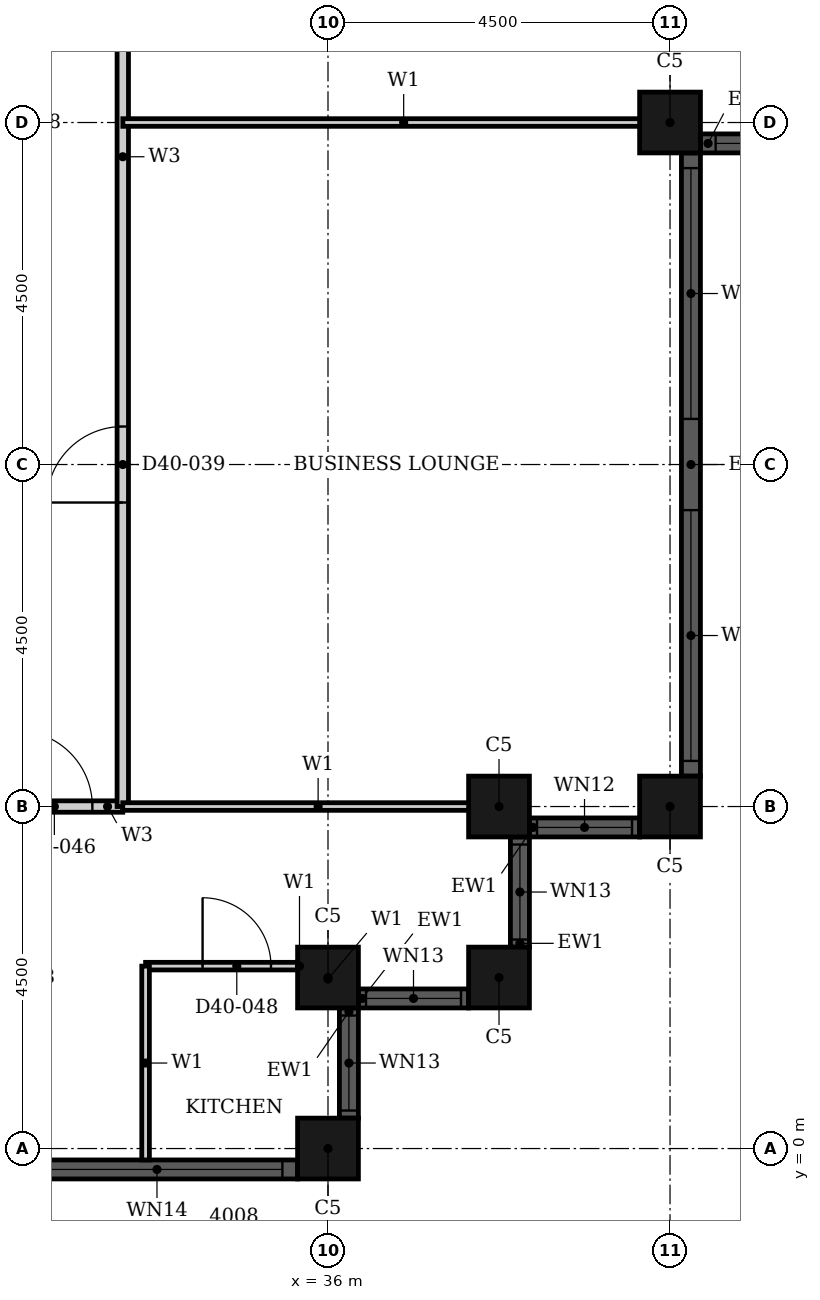
"""IFC4 building model, lengths in metres.
Left out: names, types, materials, properties, quantities, classifications, styles, units other than length and angle.
Written with IfcOpenShell. Run it as: python <this file> out.ifc"""

import sys

from ifc_helpers import new_model, si_unit, direction, frame, frame_2d, origin, origin_2d, place, context, subcontext, project, spatial, rectangle, hollow_rectangle, extrude, element, fill, save


model = new_model("IFC4")
c1 = context("Model", 3, precision=1e-05, world=origin(), true_north=direction((0.0, 1.0)))
c2 = subcontext(c1, "Body", "Model", "MODEL_VIEW")
j1 = project(units=[si_unit("LENGTHUNIT", "METRE"), si_unit("PLANEANGLEUNIT", "RADIAN")], contexts=[c1])
p1 = place(None, origin())
s1 = spatial("IfcSite", under=j1, at=p1, CompositionType="ELEMENT")
p2 = place(p1, origin())
s2 = spatial("IfcBuilding", under=s1, at=p2, CompositionType="ELEMENT")
p3 = place(p2, frame((0.0, 0.0, 161.7)))
s3 = spatial("IfcBuildingStorey", under=s2, at=p3, CompositionType="ELEMENT", Elevation=161.7)
for number, where, z_axis, x_axis in (
    (1, (36.0, 0.0, 0.0), (0.0, 0.0, 1.0), (1.0, 0.0, 0.0)),
    (2, (36.0, 2.25, 0.0), (0.0, 0.0, 1.0), (1.0, 0.0, 0.0)),
    (3, (38.25, 2.25, 0.0), (0.0, 0.0, 1.0), (1.0, 0.0, 0.0)),
    (4, (38.25, 4.5, 0.0), (0.0, 0.0, 1.0), (1.0, 0.0, 0.0)),
    (5, (40.5, 4.5, 0.0), (0.0, 0.0, 1.0), (1.0, 0.0, 0.0)),
    (6, (40.5, 13.5, 0.0), (0.0, 0.0, 1.0), (1.0, 0.0, 0.0)),
):
    element("IfcColumn", number, at=place(p3, frame(where, z_axis=z_axis, x_axis=x_axis)), inside=s3, PredefinedType="COLUMN", context=c2, shape_type="SweptSolid", body=[
        extrude(hollow_rectangle(XDim=0.8, YDim=0.8, WallThickness=0.025, at=origin_2d()), origin(), (0.0, 0.0, 1.0), 3.7),
    ])
p4 = place(p3, frame((27.4, -0.275, 0.0), z_axis=(0.0, 0.0, 1.0), x_axis=(1.0, 0.0, 0.0)))
e7 = element("IfcWall", 7, at=p4, inside=s3, PredefinedType="SOLIDWALL", context=c2, shape_type="SweptSolid", body=[
    extrude(rectangle(XDim=8.2, YDim=0.25, at=frame_2d((4.1, 0.0))), origin(), (0.0, 0.0, 1.0), 3.7),
])
p5 = place(p4, frame((0.2, 0.0, 0.45)))
e8 = element("IfcOpeningElement", 8, at=p5, cuts=e7, PredefinedType="OPENING", context=c2, shape_type="SweptSolid", body=[
    extrude(rectangle(XDim=3.3, YDim=2.53, at=frame_2d((1.65, 1.265))), frame((0.0, 0.135, 0.0), z_axis=(0.0, -1.0, 0.0), x_axis=(1.0, 0.0, 0.0)), (0.0, 0.0, 1.0), 0.27),
])
p6 = place(p4, frame((4.7, 0.0, 0.45)))
e9 = element("IfcOpeningElement", 9, at=p6, cuts=e7, PredefinedType="OPENING", context=c2, shape_type="SweptSolid", body=[
    extrude(rectangle(XDim=3.3, YDim=2.53, at=frame_2d((1.65, 1.265))), frame((0.0, 0.135, 0.0), z_axis=(0.0, -1.0, 0.0), x_axis=(1.0, 0.0, 0.0)), (0.0, 0.0, 1.0), 0.27),
])
p7 = place(p3, frame((36.275, 0.4, 0.0), z_axis=(0.0, 0.0, 1.0), x_axis=(0.0, 1.0, 0.0)))
e10 = element("IfcWall", 10, at=p7, inside=s3, PredefinedType="SOLIDWALL", context=c2, shape_type="SweptSolid", body=[
    extrude(rectangle(XDim=1.45, YDim=0.25, at=frame_2d((0.725, 0.0))), origin(), (0.0, 0.0, 1.0), 3.7),
])
p8 = place(p7, frame((0.1, 0.0, 0.9)))
e11 = element("IfcOpeningElement", 11, at=p8, cuts=e10, PredefinedType="OPENING", context=c2, shape_type="SweptSolid", body=[
    extrude(rectangle(XDim=1.25, YDim=1.85, at=frame_2d((0.625, 0.925))), frame((0.0, 0.135, 0.0), z_axis=(0.0, -1.0, 0.0), x_axis=(1.0, 0.0, 0.0)), (0.0, 0.0, 1.0), 0.27),
])
p9 = place(p3, frame((36.4, 1.975, 0.0), z_axis=(0.0, 0.0, 1.0), x_axis=(1.0, 0.0, 0.0)))
e12 = element("IfcWall", 12, at=p9, inside=s3, PredefinedType="SOLIDWALL", context=c2, shape_type="SweptSolid", body=[
    extrude(rectangle(XDim=1.45, YDim=0.25, at=frame_2d((0.725, 0.0))), origin(), (0.0, 0.0, 1.0), 3.7),
])
p10 = place(p9, frame((0.1, 0.0, 0.9)))
e13 = element("IfcOpeningElement", 13, at=p10, cuts=e12, PredefinedType="OPENING", context=c2, shape_type="SweptSolid", body=[
    extrude(rectangle(XDim=1.25, YDim=1.85, at=frame_2d((0.625, 0.925))), frame((0.0, 0.135, 0.0), z_axis=(0.0, -1.0, 0.0), x_axis=(1.0, 0.0, 0.0)), (0.0, 0.0, 1.0), 0.27),
])
p11 = place(p3, frame((38.525, 2.65, 0.0), z_axis=(0.0, 0.0, 1.0), x_axis=(0.0, 1.0, 0.0)))
e14 = element("IfcWall", 14, at=p11, inside=s3, PredefinedType="SOLIDWALL", context=c2, shape_type="SweptSolid", body=[
    extrude(rectangle(XDim=1.45, YDim=0.25, at=frame_2d((0.725, 0.0))), origin(), (0.0, 0.0, 1.0), 3.7),
])
p12 = place(p11, frame((0.1, 0.0, 0.9)))
e15 = element("IfcOpeningElement", 15, at=p12, cuts=e14, PredefinedType="OPENING", context=c2, shape_type="SweptSolid", body=[
    extrude(rectangle(XDim=1.25, YDim=1.85, at=frame_2d((0.625, 0.925))), frame((0.0, 0.135, 0.0), z_axis=(0.0, -1.0, 0.0), x_axis=(1.0, 0.0, 0.0)), (0.0, 0.0, 1.0), 0.27),
])
p13 = place(p3, frame((38.65, 4.225, 0.0), z_axis=(0.0, 0.0, 1.0), x_axis=(1.0, 0.0, 0.0)))
e16 = element("IfcWall", 16, at=p13, inside=s3, PredefinedType="SOLIDWALL", context=c2, shape_type="SweptSolid", body=[
    extrude(rectangle(XDim=1.45, YDim=0.25, at=frame_2d((0.725, 0.0))), origin(), (0.0, 0.0, 1.0), 3.7),
])
p14 = place(p13, frame((0.1, 0.0, 0.9)))
e17 = element("IfcOpeningElement", 17, at=p14, cuts=e16, PredefinedType="OPENING", context=c2, shape_type="SweptSolid", body=[
    extrude(rectangle(XDim=1.25, YDim=2.08, at=frame_2d((0.625, 1.04))), frame((0.0, 0.135, 0.0), z_axis=(0.0, -1.0, 0.0), x_axis=(1.0, 0.0, 0.0)), (0.0, 0.0, 1.0), 0.27),
])
p15 = place(p3, frame((40.775, 4.9, 0.0), z_axis=(0.0, 0.0, 1.0), x_axis=(0.0, 1.0, 0.0)))
e18 = element("IfcWall", 18, at=p15, inside=s3, PredefinedType="SOLIDWALL", context=c2, shape_type="SweptSolid", body=[
    extrude(rectangle(XDim=8.2, YDim=0.25, at=frame_2d((4.1, 0.0))), origin(), (0.0, 0.0, 1.0), 3.7),
])
p16 = place(p15, frame((0.2, 0.0, 0.45)))
e19 = element("IfcOpeningElement", 19, at=p16, cuts=e18, PredefinedType="OPENING", context=c2, shape_type="SweptSolid", body=[
    extrude(rectangle(XDim=3.3, YDim=2.3, at=frame_2d((1.65, 1.15))), frame((0.0, 0.135, 0.0), z_axis=(0.0, -1.0, 0.0), x_axis=(1.0, 0.0, 0.0)), (0.0, 0.0, 1.0), 0.27),
])
p17 = place(p15, frame((4.7, 0.0, 0.45)))
e20 = element("IfcOpeningElement", 20, at=p17, cuts=e18, PredefinedType="OPENING", context=c2, shape_type="SweptSolid", body=[
    extrude(rectangle(XDim=3.3, YDim=2.3, at=frame_2d((1.65, 1.15))), frame((0.0, 0.135, 0.0), z_axis=(0.0, -1.0, 0.0), x_axis=(1.0, 0.0, 0.0)), (0.0, 0.0, 1.0), 0.27),
])
p18 = place(p3, frame((40.9, 13.225, 0.0), z_axis=(0.0, 0.0, 1.0), x_axis=(1.0, 0.0, 0.0)))
e21 = element("IfcWall", 21, at=p18, inside=s3, PredefinedType="SOLIDWALL", context=c2, shape_type="SweptSolid", body=[
    extrude(rectangle(XDim=3.7, YDim=0.25, at=frame_2d((1.85, 0.0))), origin(), (0.0, 0.0, 1.0), 3.7),
])
p19 = place(p18, frame((0.2, 0.0, 0.45)))
e22 = element("IfcOpeningElement", 22, at=p19, cuts=e21, PredefinedType="OPENING", context=c2, shape_type="SweptSolid", body=[
    extrude(rectangle(XDim=3.3, YDim=2.3, at=frame_2d((1.65, 1.15))), frame((0.0, 0.135, 0.0), z_axis=(0.0, -1.0, 0.0), x_axis=(1.0, 0.0, 0.0)), (0.0, 0.0, 1.0), 0.27),
])
p20 = place(p3, frame((31.5, 4.5, 0.0), z_axis=(0.0, 0.0, 1.0), x_axis=(1.0, 0.0, 0.0)))
e23 = element("IfcWall", 23, at=p20, inside=s3, PredefinedType="PARTITIONING", context=c2, shape_type="SweptSolid", body=[
    extrude(rectangle(XDim=1.8, YDim=0.15, at=frame_2d((0.9, 0.0))), origin(), (0.0, 0.0, 1.0), 3.4),
])
p21 = place(p20, frame((0.4, 0.0, 0.0)))
e24 = element("IfcOpeningElement", 24, at=p21, cuts=e23, PredefinedType="OPENING", context=c2, shape_type="SweptSolid", body=[
    extrude(rectangle(XDim=1.0, YDim=2.2, at=frame_2d((0.5, 1.1))), frame((0.0, 0.085, 0.0), z_axis=(0.0, -1.0, 0.0), x_axis=(1.0, 0.0, 0.0)), (0.0, 0.0, 1.0), 0.17),
])
p22 = place(p3, frame((33.3, 4.5, 0.0), z_axis=(0.0, 0.0, 1.0), x_axis=(0.0, 1.0, 0.0)))
e25 = element("IfcWall", 25, at=p22, inside=s3, PredefinedType="PARTITIONING", context=c2, shape_type="SweptSolid", body=[
    extrude(rectangle(XDim=16.199, YDim=0.15, at=frame_2d((8.1, 0.0))), origin(), (0.0, 0.0, 1.0), 3.4),
])
p23 = place(p22, frame((12.099, 0.0, 0.0)))
e26 = element("IfcOpeningElement", 26, at=p23, cuts=e25, PredefinedType="OPENING", context=c2, shape_type="SweptSolid", body=[
    extrude(rectangle(XDim=1.0, YDim=2.2, at=frame_2d((0.5, 1.1))), frame((0.0, 0.085, 0.0), z_axis=(0.0, -1.0, 0.0), x_axis=(1.0, 0.0, 0.0)), (0.0, 0.0, 1.0), 0.17),
])
p24 = place(p22, frame((4.0, 0.0, 0.0)))
e27 = element("IfcOpeningElement", 27, at=p24, cuts=e25, PredefinedType="OPENING", context=c2, shape_type="SweptSolid", body=[
    extrude(rectangle(XDim=1.0, YDim=2.1, at=frame_2d((0.5, 1.05))), frame((0.0, 0.085, 0.0), z_axis=(0.0, -1.0, 0.0), x_axis=(1.0, 0.0, 0.0)), (0.0, 0.0, 1.0), 0.17),
])
p25 = place(p3, frame((33.301, 13.5, 0.0), z_axis=(0.0, 0.0, 1.0), x_axis=(1.0, 0.0, 0.0)))
e28 = element("IfcWall", 28, at=p25, inside=s3, PredefinedType="PARTITIONING", context=c2, shape_type="SweptSolid", body=[
    extrude(rectangle(XDim=7.389, YDim=0.1, at=frame_2d((3.694, 0.0))), origin(), (0.0, 0.0, 1.0), 2.48),
])
p26 = place(p3, frame((33.6, 2.4, 0.0), z_axis=(0.0, 0.0, 1.0), x_axis=(1.0, 0.0, 0.0)))
e29 = element("IfcWall", 29, at=p26, inside=s3, PredefinedType="PARTITIONING", context=c2, shape_type="SweptSolid", body=[
    extrude(rectangle(XDim=2.4, YDim=0.1, at=frame_2d((1.2, 0.0))), origin(), (0.0, 0.0, 1.0), 3.4),
])
p27 = place(p26, frame((0.75, 0.0, 0.0)))
e30 = element("IfcOpeningElement", 30, at=p27, cuts=e29, PredefinedType="OPENING", context=c2, shape_type="SweptSolid", body=[
    extrude(rectangle(XDim=0.9, YDim=2.1, at=frame_2d((0.45, 1.05))), frame((0.0, 0.06, 0.0), z_axis=(0.0, -1.0, 0.0), x_axis=(1.0, 0.0, 0.0)), (0.0, 0.0, 1.0), 0.12),
])
p28 = place(p3, frame((33.3, 4.5, 0.0), z_axis=(0.0, 0.0, 1.0), x_axis=(1.0, 0.0, 0.0)))
e31 = element("IfcWall", 31, at=p28, inside=s3, PredefinedType="PARTITIONING", context=c2, shape_type="SweptSolid", body=[
    extrude(rectangle(XDim=5.14, YDim=0.1, at=frame_2d((2.57, 0.0))), origin(), (0.0, 0.0, 1.0), 3.4),
])
p29 = place(p3, frame((33.6, -0.15, 0.0), z_axis=(0.0, 0.0, 1.0), x_axis=(0.0, 1.0, 0.0)))
e32 = element("IfcWall", 32, at=p29, inside=s3, PredefinedType="PARTITIONING", context=c2, shape_type="SweptSolid", body=[
    extrude(rectangle(XDim=2.55, YDim=0.1, at=frame_2d((1.275, 0.0))), origin(), (0.0, 0.0, 1.0), 3.4),
])
p30 = place(p3, frame((36.0, 2.06, 0.0), z_axis=(0.0, 0.0, 1.0), x_axis=(0.0, 1.0, 0.0)))
e33 = element("IfcWall", 33, at=p30, inside=s3, PredefinedType="PARTITIONING", context=c2, shape_type="SweptSolid", body=[
    extrude(rectangle(XDim=0.34, YDim=0.1, at=frame_2d((0.17, 0.0))), origin(), (0.0, 0.0, 1.0), 3.4),
])
p31 = place(p6, origin())
e34 = element("IfcWindow", 34, at=p31, inside=s3, PartitioningType="SINGLE_PANEL", PredefinedType="WINDOW", context=c2, shape_type="SweptSolid", body=[
    extrude(rectangle(XDim=3.3, YDim=2.53, at=frame_2d((1.65, 1.265))), frame((0.0, 0.03, 0.0), z_axis=(0.0, -1.0, 0.0), x_axis=(1.0, 0.0, 0.0)), (0.0, 0.0, 1.0), 0.06),
])
fill(e9, e34)
p32 = place(p8, origin())
e35 = element("IfcWindow", 35, at=p32, inside=s3, PartitioningType="SINGLE_PANEL", PredefinedType="WINDOW", context=c2, shape_type="SweptSolid", body=[
    extrude(rectangle(XDim=1.25, YDim=1.85, at=frame_2d((0.625, 0.925))), frame((0.0, 0.03, 0.0), z_axis=(0.0, -1.0, 0.0), x_axis=(1.0, 0.0, 0.0)), (0.0, 0.0, 1.0), 0.06),
])
fill(e11, e35)
p33 = place(p10, origin())
e36 = element("IfcWindow", 36, at=p33, inside=s3, PartitioningType="SINGLE_PANEL", PredefinedType="WINDOW", context=c2, shape_type="SweptSolid", body=[
    extrude(rectangle(XDim=1.25, YDim=1.85, at=frame_2d((0.625, 0.925))), frame((0.0, 0.03, 0.0), z_axis=(0.0, -1.0, 0.0), x_axis=(1.0, 0.0, 0.0)), (0.0, 0.0, 1.0), 0.06),
])
fill(e13, e36)
p34 = place(p12, origin())
e37 = element("IfcWindow", 37, at=p34, inside=s3, PartitioningType="SINGLE_PANEL", PredefinedType="WINDOW", context=c2, shape_type="SweptSolid", body=[
    extrude(rectangle(XDim=1.25, YDim=1.85, at=frame_2d((0.625, 0.925))), frame((0.0, 0.03, 0.0), z_axis=(0.0, -1.0, 0.0), x_axis=(1.0, 0.0, 0.0)), (0.0, 0.0, 1.0), 0.06),
])
fill(e15, e37)
p35 = place(p14, origin())
e38 = element("IfcWindow", 38, at=p35, inside=s3, PartitioningType="SINGLE_PANEL", PredefinedType="WINDOW", context=c2, shape_type="SweptSolid", body=[
    extrude(rectangle(XDim=1.25, YDim=2.08, at=frame_2d((0.625, 1.04))), frame((0.0, 0.03, 0.0), z_axis=(0.0, -1.0, 0.0), x_axis=(1.0, 0.0, 0.0)), (0.0, 0.0, 1.0), 0.06),
])
fill(e17, e38)
p36 = place(p16, origin())
e39 = element("IfcWindow", 39, at=p36, inside=s3, PartitioningType="SINGLE_PANEL", PredefinedType="WINDOW", context=c2, shape_type="SweptSolid", body=[
    extrude(rectangle(XDim=3.3, YDim=2.3, at=frame_2d((1.65, 1.15))), frame((0.0, 0.03, 0.0), z_axis=(0.0, -1.0, 0.0), x_axis=(1.0, 0.0, 0.0)), (0.0, 0.0, 1.0), 0.06),
])
fill(e19, e39)
p37 = place(p17, origin())
e40 = element("IfcWindow", 40, at=p37, inside=s3, PartitioningType="SINGLE_PANEL", PredefinedType="WINDOW", context=c2, shape_type="SweptSolid", body=[
    extrude(rectangle(XDim=3.3, YDim=2.3, at=frame_2d((1.65, 1.15))), frame((0.0, 0.03, 0.0), z_axis=(0.0, -1.0, 0.0), x_axis=(1.0, 0.0, 0.0)), (0.0, 0.0, 1.0), 0.06),
])
fill(e20, e40)
p38 = place(p19, origin())
e41 = element("IfcWindow", 41, at=p38, inside=s3, PartitioningType="SINGLE_PANEL", PredefinedType="WINDOW", context=c2, shape_type="SweptSolid", body=[
    extrude(rectangle(XDim=3.3, YDim=2.3, at=frame_2d((1.65, 1.15))), frame((0.0, 0.03, 0.0), z_axis=(0.0, -1.0, 0.0), x_axis=(1.0, 0.0, 0.0)), (0.0, 0.0, 1.0), 0.06),
])
fill(e22, e41)
p39 = place(p24, origin())
e42 = element("IfcDoor", 42, at=p39, inside=s3, OperationType="SINGLE_SWING_RIGHT", PredefinedType="DOOR", context=c2, shape_type="SweptSolid", body=[
    extrude(rectangle(XDim=1.0, YDim=2.1, at=frame_2d((0.5, 1.05))), frame((0.0, 0.025, 0.0), z_axis=(0.0, -1.0, 0.0), x_axis=(1.0, 0.0, 0.0)), (0.0, 0.0, 1.0), 0.05),
])
fill(e27, e42)
p40 = place(p21, origin())
e43 = element("IfcDoor", 43, at=p40, inside=s3, OperationType="SINGLE_SWING_RIGHT", PredefinedType="DOOR", context=c2, shape_type="SweptSolid", body=[
    extrude(rectangle(XDim=1.0, YDim=2.2, at=frame_2d((0.5, 1.1))), frame((0.0, 0.025, 0.0), z_axis=(0.0, -1.0, 0.0), x_axis=(1.0, 0.0, 0.0)), (0.0, 0.0, 1.0), 0.05),
])
fill(e24, e43)
p41 = place(p27, origin())
e44 = element("IfcDoor", 44, at=p41, inside=s3, OperationType="SINGLE_SWING_RIGHT", PredefinedType="DOOR", context=c2, shape_type="SweptSolid", body=[
    extrude(rectangle(XDim=0.9, YDim=2.1, at=frame_2d((0.45, 1.05))), frame((0.0, 0.025, 0.0), z_axis=(0.0, -1.0, 0.0), x_axis=(1.0, 0.0, 0.0)), (0.0, 0.0, 1.0), 0.05),
])
fill(e30, e44)
save(model, sys.argv[1])
